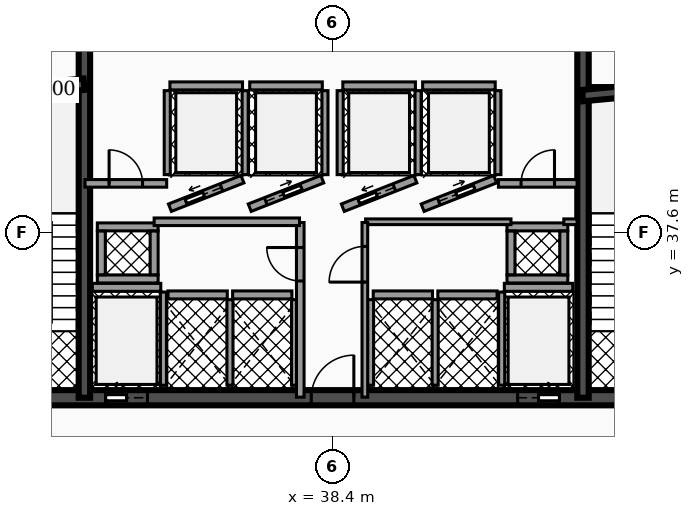
"""IFC4 building model, lengths in metres.
Left out: names, types, materials, properties, quantities, classifications, styles, units other than length and angle.
Written with IfcOpenShell. Run it as: python <this file> out.ifc"""

import sys

from ifc_helpers import new_model, si_unit, direction, frame, frame_2d, origin, place, context, subcontext, project, spatial, rectangle, extrude, element, fill, save


model = new_model("IFC4")
c1 = context("Model", 3, precision=1e-05, world=origin(), true_north=direction((0.0, 1.0)))
c2 = subcontext(c1, "Body", "Model", "MODEL_VIEW")
j1 = project(units=[si_unit("LENGTHUNIT", "METRE"), si_unit("PLANEANGLEUNIT", "RADIAN")], contexts=[c1])
p1 = place(None, origin())
s1 = spatial("IfcSite", under=j1, at=p1, CompositionType="ELEMENT")
p2 = place(p1, origin())
s2 = spatial("IfcBuilding", under=s1, at=p2, CompositionType="ELEMENT")
p3 = place(p2, frame((0.0, 0.0, 92.82)))
s3 = spatial("IfcBuildingStorey", under=s2, at=p3, CompositionType="ELEMENT", Elevation=92.82)
p4 = place(p3, frame((28.4, 33.25, 0.0), z_axis=(0.0, 0.0, 1.0), x_axis=(1.0, 0.0, 0.0)))
e1 = element("IfcWall", 1, at=p4, inside=s3, PredefinedType="SHEAR", context=c2, shape_type="SweptSolid", body=[
    extrude(rectangle(XDim=20.06, YDim=0.4, at=frame_2d((10.03, 0.0))), origin(), (0.0, 0.0, 1.0), 3.82),
])
p5 = place(p4, frame((4.03, 0.0, 0.0)))
e2 = element("IfcOpeningElement", 2, at=p5, cuts=e1, PredefinedType="OPENING", context=c2, shape_type="SweptSolid", body=[
    extrude(rectangle(XDim=1.1, YDim=2.15, at=frame_2d((0.55, 1.075))), frame((0.0, 0.21, 0.0), z_axis=(0.0, -1.0, 0.0), x_axis=(1.0, 0.0, 0.0)), (0.0, 0.0, 1.0), 0.42),
])
p6 = place(p4, frame((14.87, 0.0, 0.0)))
e3 = element("IfcOpeningElement", 3, at=p6, cuts=e1, PredefinedType="OPENING", context=c2, shape_type="SweptSolid", body=[
    extrude(rectangle(XDim=1.1, YDim=2.15, at=frame_2d((0.55, 1.075))), frame((0.0, 0.21, 0.0), z_axis=(0.0, -1.0, 0.0), x_axis=(1.0, 0.0, 0.0)), (0.0, 0.0, 1.0), 0.42),
])
p7 = place(p4, frame((1.31, 0.0, 0.0)))
e4 = element("IfcOpeningElement", 4, at=p7, cuts=e1, PredefinedType="OPENING", context=c2, shape_type="SweptSolid", body=[
    extrude(rectangle(XDim=1.1, YDim=2.2, at=frame_2d((0.55, 1.1))), frame((0.0, 0.21, 0.0), z_axis=(0.0, -1.0, 0.0), x_axis=(1.0, 0.0, 0.0)), (0.0, 0.0, 1.0), 0.42),
])
p8 = place(p4, frame((9.44, 0.0, 0.0)))
e5 = element("IfcOpeningElement", 5, at=p8, cuts=e1, PredefinedType="OPENING", context=c2, shape_type="SweptSolid", body=[
    extrude(rectangle(XDim=1.12, YDim=2.05, at=frame_2d((0.56, 1.025))), frame((0.0, 0.21, 0.0), z_axis=(0.0, -1.0, 0.0), x_axis=(1.0, 0.0, 0.0)), (0.0, 0.0, 1.0), 0.42),
])
p9 = place(p4, frame((17.65, 0.0, 0.0)))
e6 = element("IfcOpeningElement", 6, at=p9, cuts=e1, PredefinedType="OPENING", context=c2, shape_type="SweptSolid", body=[
    extrude(rectangle(XDim=1.1, YDim=2.2, at=frame_2d((0.55, 1.1))), frame((0.0, 0.21, 0.0), z_axis=(0.0, -1.0, 0.0), x_axis=(1.0, 0.0, 0.0)), (0.0, 0.0, 1.0), 0.42),
])
for number, where, z_axis, x_axis in (
    (7, (31.87, 33.25, 0.0), (0.0, 0.0, 1.0), (0.0, 1.0, 0.0)),
    (8, (44.99, 33.25, 0.0), (0.0, 0.0, 1.0), (0.0, 1.0, 0.0)),
):
    element("IfcWall", number, at=place(p3, frame(where, z_axis=z_axis, x_axis=x_axis)), inside=s3, PredefinedType="SHEAR", context=c2, shape_type="SweptSolid", body=[
        extrude(rectangle(XDim=10.2, YDim=0.3, at=frame_2d((5.1, 0.0))), origin(), (0.0, 0.0, 1.0), 3.82),
    ])
p10 = place(p3, frame((28.64, 41.2, 0.0), z_axis=(0.0, 0.0, 1.0), x_axis=(0.995687118776, 0.092774789157, 0.0)))
e9 = element("IfcWall", 9, at=p10, inside=s3, PredefinedType="SHEAR", context=c2, shape_type="SweptSolid", body=[
    extrude(rectangle(XDim=3.234, YDim=0.3, at=frame_2d((1.617, 0.0))), origin(), (0.0, 0.0, 1.0), 3.82),
])
p11 = place(p3, frame((44.98, 41.2, 0.0), z_axis=(0.0, 0.0, 1.0), x_axis=(0.995686468965, 0.09278176286, 0.0)))
e10 = element("IfcWall", 10, at=p11, inside=s3, PredefinedType="SHEAR", context=c2, shape_type="SweptSolid", body=[
    extrude(rectangle(XDim=3.234, YDim=0.3, at=frame_2d((1.617, 0.0))), origin(), (0.0, 0.0, 1.0), 3.82),
])
p12 = place(p3, frame((32.08, 36.155, 0.0), z_axis=(0.0, 0.0, 1.0), x_axis=(1.0, 0.0, 0.0)))
e11 = element("IfcWall", 11, at=p12, inside=s3, PredefinedType="SOLIDWALL", context=c2, shape_type="SweptSolid", body=[
    extrude(rectangle(XDim=1.8, YDim=0.21, at=frame_2d((0.9, 0.0))), origin(), (0.0, 0.0, 1.0), 2.792),
])
p13 = place(p3, frame((33.95, 33.58, 0.0), z_axis=(0.0, 0.0, 1.0), x_axis=(0.0, 1.0, 0.0)))
e12 = element("IfcWall", 12, at=p13, inside=s3, PredefinedType="SOLIDWALL", context=c2, shape_type="SweptSolid", body=[
    extrude(rectangle(XDim=2.45, YDim=0.16, at=frame_2d((1.225, 0.0))), origin(), (0.0, 0.0, 1.0), 2.792),
])
p14 = place(p3, frame((42.92, 36.155, 0.0), z_axis=(0.0, 0.0, 1.0), x_axis=(1.0, 0.0, 0.0)))
e13 = element("IfcWall", 13, at=p14, inside=s3, PredefinedType="SOLIDWALL", context=c2, shape_type="SweptSolid", body=[
    extrude(rectangle(XDim=1.8, YDim=0.21, at=frame_2d((0.9, 0.0))), origin(), (0.0, 0.0, 1.0), 2.792),
])
p15 = place(p3, frame((42.85, 33.58, 0.0), z_axis=(0.0, 0.0, 1.0), x_axis=(0.0, 1.0, 0.0)))
e14 = element("IfcWall", 14, at=p15, inside=s3, PredefinedType="SOLIDWALL", context=c2, shape_type="SweptSolid", body=[
    extrude(rectangle(XDim=2.45, YDim=0.16, at=frame_2d((1.225, 0.0))), origin(), (0.0, 0.0, 1.0), 2.792),
])
p16 = place(p3, frame((34.12, 38.25, 0.0), z_axis=(0.0, 0.0, 1.0), x_axis=(0.930804993012, 0.36551616241, 0.0)))
e15 = element("IfcWall", 15, at=p16, inside=s3, PredefinedType="SOLIDWALL", context=c2, shape_type="SweptSolid", body=[
    extrude(rectangle(XDim=2.052, YDim=0.21, at=frame_2d((1.026, 0.0))), origin(), (0.0, 0.0, 1.0), 2.792),
])
p17 = place(p16, frame((0.455, 0.0, 0.0)))
e16 = element("IfcOpeningElement", 16, at=p17, cuts=e15, PredefinedType="OPENING", context=c2, shape_type="SweptSolid", body=[
    extrude(rectangle(XDim=1.0, YDim=2.1, at=frame_2d((0.5, 1.05))), frame((0.0, 0.115, 0.0), z_axis=(0.0, -1.0, 0.0), x_axis=(1.0, 0.0, 0.0)), (0.0, 0.0, 1.0), 0.23),
])
p18 = place(p3, frame((34.12, 41.455, 0.0), z_axis=(0.0, 0.0, 1.0), x_axis=(1.0, 0.0, 0.0)))
e17 = element("IfcWall", 17, at=p18, inside=s3, PredefinedType="SOLIDWALL", context=c2, shape_type="SweptSolid", body=[
    extrude(rectangle(XDim=1.91, YDim=0.21, at=frame_2d((0.955, 0.0))), origin(), (0.0, 0.0, 1.0), 2.792),
])
for number, where, z_axis, x_axis in (
    (18, (34.05, 39.12, 0.0), (0.0, 0.0, 1.0), (0.0, 1.0, 0.0)),
    (19, (36.1, 39.12, 0.0), (0.0, 0.0, 1.0), (0.0, 1.0, 0.0)),
):
    element("IfcWall", number, at=place(p3, frame(where, z_axis=z_axis, x_axis=x_axis)), inside=s3, PredefinedType="SOLIDWALL", context=c2, shape_type="SweptSolid", body=[
        extrude(rectangle(XDim=2.21, YDim=0.16, at=frame_2d((1.105, 0.0))), origin(), (0.0, 0.0, 1.0), 2.792),
    ])
p19 = place(p3, frame((36.22, 38.25, 0.0), z_axis=(0.0, 0.0, 1.0), x_axis=(0.930804993012, 0.36551616241, 0.0)))
e20 = element("IfcWall", 20, at=p19, inside=s3, PredefinedType="SOLIDWALL", context=c2, shape_type="SweptSolid", body=[
    extrude(rectangle(XDim=2.052, YDim=0.21, at=frame_2d((1.026, 0.0))), origin(), (0.0, 0.0, 1.0), 2.792),
])
p20 = place(p19, frame((0.455, 0.0, 0.0)))
e21 = element("IfcOpeningElement", 21, at=p20, cuts=e20, PredefinedType="OPENING", context=c2, shape_type="SweptSolid", body=[
    extrude(rectangle(XDim=1.0, YDim=2.1, at=frame_2d((0.5, 1.05))), frame((0.0, 0.115, 0.0), z_axis=(0.0, -1.0, 0.0), x_axis=(1.0, 0.0, 0.0)), (0.0, 0.0, 1.0), 0.23),
])
p21 = place(p3, frame((36.22, 41.455, 0.0), z_axis=(0.0, 0.0, 1.0), x_axis=(1.0, 0.0, 0.0)))
e22 = element("IfcWall", 22, at=p21, inside=s3, PredefinedType="SOLIDWALL", context=c2, shape_type="SweptSolid", body=[
    extrude(rectangle(XDim=1.91, YDim=0.21, at=frame_2d((0.955, 0.0))), origin(), (0.0, 0.0, 1.0), 2.792),
])
p22 = place(p3, frame((38.2, 39.12, 0.0), z_axis=(0.0, 0.0, 1.0), x_axis=(0.0, 1.0, 0.0)))
e23 = element("IfcWall", 23, at=p22, inside=s3, PredefinedType="SOLIDWALL", context=c2, shape_type="SweptSolid", body=[
    extrude(rectangle(XDim=2.21, YDim=0.16, at=frame_2d((1.105, 0.0))), origin(), (0.0, 0.0, 1.0), 2.792),
])
p23 = place(p3, frame((38.67, 38.25, 0.0), z_axis=(0.0, 0.0, 1.0), x_axis=(0.930820886763, 0.3654756856, 0.0)))
e24 = element("IfcWall", 24, at=p23, inside=s3, PredefinedType="SOLIDWALL", context=c2, shape_type="SweptSolid", body=[
    extrude(rectangle(XDim=2.052, YDim=0.21, at=frame_2d((1.026, 0.0))), origin(), (0.0, 0.0, 1.0), 2.792),
])
p24 = place(p23, frame((0.455, 0.0, 0.0)))
e25 = element("IfcOpeningElement", 25, at=p24, cuts=e24, PredefinedType="OPENING", context=c2, shape_type="SweptSolid", body=[
    extrude(rectangle(XDim=1.0, YDim=2.1, at=frame_2d((0.5, 1.05))), frame((0.0, 0.115, 0.0), z_axis=(0.0, -1.0, 0.0), x_axis=(1.0, 0.0, 0.0)), (0.0, 0.0, 1.0), 0.23),
])
p25 = place(p3, frame((38.67, 41.455, 0.0), z_axis=(0.0, 0.0, 1.0), x_axis=(1.0, 0.0, 0.0)))
e26 = element("IfcWall", 26, at=p25, inside=s3, PredefinedType="SOLIDWALL", context=c2, shape_type="SweptSolid", body=[
    extrude(rectangle(XDim=1.91, YDim=0.21, at=frame_2d((0.955, 0.0))), origin(), (0.0, 0.0, 1.0), 2.792),
])
for number, where, z_axis, x_axis in (
    (27, (38.6, 39.12, 0.0), (0.0, 0.0, 1.0), (0.0, 1.0, 0.0)),
    (28, (40.65, 39.12, 0.0), (0.0, 0.0, 1.0), (0.0, 1.0, 0.0)),
):
    element("IfcWall", number, at=place(p3, frame(where, z_axis=z_axis, x_axis=x_axis)), inside=s3, PredefinedType="SOLIDWALL", context=c2, shape_type="SweptSolid", body=[
        extrude(rectangle(XDim=2.21, YDim=0.16, at=frame_2d((1.105, 0.0))), origin(), (0.0, 0.0, 1.0), 2.792),
    ])
p26 = place(p3, frame((40.77, 38.25, 0.0), z_axis=(0.0, 0.0, 1.0), x_axis=(0.930804993012, 0.36551616241, 0.0)))
e29 = element("IfcWall", 29, at=p26, inside=s3, PredefinedType="SOLIDWALL", context=c2, shape_type="SweptSolid", body=[
    extrude(rectangle(XDim=2.052, YDim=0.21, at=frame_2d((1.026, 0.0))), origin(), (0.0, 0.0, 1.0), 2.792),
])
p27 = place(p26, frame((0.455, 0.0, 0.0)))
e30 = element("IfcOpeningElement", 30, at=p27, cuts=e29, PredefinedType="OPENING", context=c2, shape_type="SweptSolid", body=[
    extrude(rectangle(XDim=1.0, YDim=2.1, at=frame_2d((0.5, 1.05))), frame((0.0, 0.115, 0.0), z_axis=(0.0, -1.0, 0.0), x_axis=(1.0, 0.0, 0.0)), (0.0, 0.0, 1.0), 0.23),
])
p28 = place(p3, frame((40.77, 41.455, 0.0), z_axis=(0.0, 0.0, 1.0), x_axis=(1.0, 0.0, 0.0)))
e31 = element("IfcWall", 31, at=p28, inside=s3, PredefinedType="SOLIDWALL", context=c2, shape_type="SweptSolid", body=[
    extrude(rectangle(XDim=1.91, YDim=0.21, at=frame_2d((0.955, 0.0))), origin(), (0.0, 0.0, 1.0), 2.792),
])
p29 = place(p3, frame((42.75, 39.12, 0.0), z_axis=(0.0, 0.0, 1.0), x_axis=(0.0, 1.0, 0.0)))
e32 = element("IfcWall", 32, at=p29, inside=s3, PredefinedType="SOLIDWALL", context=c2, shape_type="SweptSolid", body=[
    extrude(rectangle(XDim=2.21, YDim=0.16, at=frame_2d((1.105, 0.0))), origin(), (0.0, 0.0, 1.0), 2.792),
])
p30 = place(p3, frame((34.07, 35.955, 0.0), z_axis=(0.0, 0.0, 1.0), x_axis=(1.0, 0.0, 0.0)))
e33 = element("IfcWall", 33, at=p30, inside=s3, PredefinedType="SOLIDWALL", context=c2, shape_type="SweptSolid", body=[
    extrude(rectangle(XDim=1.56, YDim=0.21, at=frame_2d((0.78, 0.0))), origin(), (0.0, 0.0, 1.0), 2.792),
])
p31 = place(p3, frame((35.7, 33.58, 0.0), z_axis=(0.0, 0.0, 1.0), x_axis=(0.0, 1.0, 0.0)))
e34 = element("IfcWall", 34, at=p31, inside=s3, PredefinedType="SOLIDWALL", context=c2, shape_type="SweptSolid", body=[
    extrude(rectangle(XDim=2.25, YDim=0.16, at=frame_2d((1.125, 0.0))), origin(), (0.0, 0.0, 1.0), 2.792),
])
p32 = place(p3, frame((35.77, 35.955, 0.0), z_axis=(0.0, 0.0, 1.0), x_axis=(1.0, 0.0, 0.0)))
e35 = element("IfcWall", 35, at=p32, inside=s3, PredefinedType="SOLIDWALL", context=c2, shape_type="SweptSolid", body=[
    extrude(rectangle(XDim=1.56, YDim=0.21, at=frame_2d((0.78, 0.0))), origin(), (0.0, 0.0, 1.0), 2.792),
])
p33 = place(p3, frame((37.4, 33.58, 0.0), z_axis=(0.0, 0.0, 1.0), x_axis=(0.0, 1.0, 0.0)))
e36 = element("IfcWall", 36, at=p33, inside=s3, PredefinedType="SOLIDWALL", context=c2, shape_type="SweptSolid", body=[
    extrude(rectangle(XDim=2.25, YDim=0.16, at=frame_2d((1.125, 0.0))), origin(), (0.0, 0.0, 1.0), 2.792),
])
p34 = place(p3, frame((39.47, 35.955, 0.0), z_axis=(0.0, 0.0, 1.0), x_axis=(1.0, 0.0, 0.0)))
e37 = element("IfcWall", 37, at=p34, inside=s3, PredefinedType="SOLIDWALL", context=c2, shape_type="SweptSolid", body=[
    extrude(rectangle(XDim=1.56, YDim=0.21, at=frame_2d((0.78, 0.0))), origin(), (0.0, 0.0, 1.0), 2.792),
])
for number, where, z_axis, x_axis in (
    (38, (39.4, 33.58, 0.0), (0.0, 0.0, 1.0), (0.0, 1.0, 0.0)),
    (39, (41.1, 33.58, 0.0), (0.0, 0.0, 1.0), (0.0, 1.0, 0.0)),
):
    element("IfcWall", number, at=place(p3, frame(where, z_axis=z_axis, x_axis=x_axis)), inside=s3, PredefinedType="SOLIDWALL", context=c2, shape_type="SweptSolid", body=[
        extrude(rectangle(XDim=2.25, YDim=0.16, at=frame_2d((1.125, 0.0))), origin(), (0.0, 0.0, 1.0), 2.792),
    ])
p35 = place(p3, frame((41.17, 35.955, 0.0), z_axis=(0.0, 0.0, 1.0), x_axis=(1.0, 0.0, 0.0)))
e40 = element("IfcWall", 40, at=p35, inside=s3, PredefinedType="SOLIDWALL", context=c2, shape_type="SweptSolid", body=[
    extrude(rectangle(XDim=1.56, YDim=0.21, at=frame_2d((0.78, 0.0))), origin(), (0.0, 0.0, 1.0), 2.792),
])
for number, where, z_axis, x_axis in (
    (41, (32.21, 36.375, 0.0), (0.0, 0.0, 1.0), (1.0, 0.0, 0.0)),
    (42, (32.21, 37.745, 0.0), (0.0, 0.0, 1.0), (1.0, 0.0, 0.0)),
):
    element("IfcWall", number, at=place(p3, frame(where, z_axis=z_axis, x_axis=x_axis)), inside=s3, PredefinedType="SOLIDWALL", context=c2, shape_type="SweptSolid", body=[
        extrude(rectangle(XDim=1.6, YDim=0.21, at=frame_2d((0.8, 0.0))), origin(), (0.0, 0.0, 1.0), 3.82),
    ])
for number, where, z_axis, x_axis in (
    (43, (32.315, 36.485, 0.0), (0.0, 0.0, 1.0), (0.0, 1.0, 0.0)),
    (44, (33.705, 36.485, 0.0), (0.0, 0.0, 1.0), (0.0, 1.0, 0.0)),
):
    element("IfcWall", number, at=place(p3, frame(where, z_axis=z_axis, x_axis=x_axis)), inside=s3, PredefinedType="SOLIDWALL", context=c2, shape_type="SweptSolid", body=[
        extrude(rectangle(XDim=1.15, YDim=0.21, at=frame_2d((0.575, 0.0))), origin(), (0.0, 0.0, 1.0), 3.82),
    ])
for number, where, z_axis, x_axis in (
    (45, (42.99, 36.375, 0.0), (0.0, 0.0, 1.0), (1.0, 0.0, 0.0)),
    (46, (42.99, 37.745, 0.0), (0.0, 0.0, 1.0), (1.0, 0.0, 0.0)),
):
    element("IfcWall", number, at=place(p3, frame(where, z_axis=z_axis, x_axis=x_axis)), inside=s3, PredefinedType="SOLIDWALL", context=c2, shape_type="SweptSolid", body=[
        extrude(rectangle(XDim=1.6, YDim=0.21, at=frame_2d((0.8, 0.0))), origin(), (0.0, 0.0, 1.0), 3.82),
    ])
for number, where, z_axis, x_axis in (
    (47, (43.095, 36.485, 0.0), (0.0, 0.0, 1.0), (0.0, 1.0, 0.0)),
    (48, (44.485, 36.485, 0.0), (0.0, 0.0, 1.0), (0.0, 1.0, 0.0)),
):
    element("IfcWall", number, at=place(p3, frame(where, z_axis=z_axis, x_axis=x_axis)), inside=s3, PredefinedType="SOLIDWALL", context=c2, shape_type="SweptSolid", body=[
        extrude(rectangle(XDim=1.15, YDim=0.21, at=frame_2d((0.575, 0.0))), origin(), (0.0, 0.0, 1.0), 3.82),
    ])
p36 = place(p3, frame((37.55, 33.265, 0.0), z_axis=(0.0, 0.0, 1.0), x_axis=(0.0, 1.0, 0.0)))
e49 = element("IfcWall", 49, at=p36, inside=s3, PredefinedType="PARTITIONING", context=c2, shape_type="SweptSolid", body=[
    extrude(rectangle(XDim=4.595, YDim=0.2, at=frame_2d((2.298, 0.0))), origin(), (0.0, 0.0, 1.0), 2.777),
])
p37 = place(p36, frame((3.058, 0.0, 0.0)))
e50 = element("IfcOpeningElement", 50, at=p37, cuts=e49, PredefinedType="OPENING", context=c2, shape_type="SweptSolid", body=[
    extrude(rectangle(XDim=0.88, YDim=2.05, at=frame_2d((0.44, 1.025))), frame((0.0, 0.11, 0.0), z_axis=(0.0, -1.0, 0.0), x_axis=(1.0, 0.0, 0.0)), (0.0, 0.0, 1.0), 0.22),
])
p38 = place(p3, frame((33.705, 37.88, 0.0), z_axis=(0.0, 0.0, 1.0), x_axis=(1.0, 0.0, 0.0)))
e51 = element("IfcWall", 51, at=p38, inside=s3, PredefinedType="PARTITIONING", context=c2, shape_type="SweptSolid", body=[
    extrude(rectangle(XDim=3.825, YDim=0.2, at=frame_2d((1.913, 0.0))), origin(), (0.0, 0.0, 1.0), 2.777),
])
p39 = place(p3, frame((31.885, 38.89, 0.0), z_axis=(0.0, 0.0, 1.0), x_axis=(1.0, 0.0, 0.0)))
e52 = element("IfcWall", 52, at=p39, inside=s3, PredefinedType="PARTITIONING", context=c2, shape_type="SweptSolid", body=[
    extrude(rectangle(XDim=2.15, YDim=0.2, at=frame_2d((1.075, 0.0))), origin(), (0.0, 0.0, 1.0), 2.777),
])
p40 = place(p39, frame((0.635, 0.0, 0.0)))
e53 = element("IfcOpeningElement", 53, at=p40, cuts=e52, PredefinedType="OPENING", context=c2, shape_type="SweptSolid", body=[
    extrude(rectangle(XDim=0.88, YDim=2.05, at=frame_2d((0.44, 1.025))), frame((0.0, 0.11, 0.0), z_axis=(0.0, -1.0, 0.0), x_axis=(1.0, 0.0, 0.0)), (0.0, 0.0, 1.0), 0.22),
])
p41 = place(p3, frame((42.765, 38.89, 0.0), z_axis=(0.0, 0.0, 1.0), x_axis=(1.0, 0.0, 0.0)))
e54 = element("IfcWall", 54, at=p41, inside=s3, PredefinedType="PARTITIONING", context=c2, shape_type="SweptSolid", body=[
    extrude(rectangle(XDim=2.07, YDim=0.2, at=frame_2d((1.035, 0.0))), origin(), (0.0, 0.0, 1.0), 2.777),
])
p42 = place(p41, frame((0.595, 0.0, 0.0)))
e55 = element("IfcOpeningElement", 55, at=p42, cuts=e54, PredefinedType="OPENING", context=c2, shape_type="SweptSolid", body=[
    extrude(rectangle(XDim=0.88, YDim=2.05, at=frame_2d((0.44, 1.025))), frame((0.0, 0.11, 0.0), z_axis=(0.0, -1.0, 0.0), x_axis=(1.0, 0.0, 0.0)), (0.0, 0.0, 1.0), 0.22),
])
p43 = place(p3, frame((39.27, 37.88, 0.0), z_axis=(0.0, 0.0, 1.0), x_axis=(1.0, 0.0, 0.0)))
e56 = element("IfcWall", 56, at=p43, inside=s3, PredefinedType="PARTITIONING", context=c2, shape_type="SweptSolid", body=[
    extrude(rectangle(XDim=3.825, YDim=0.15, at=frame_2d((1.913, 0.0))), origin(), (0.0, 0.0, 1.0), 2.777),
])
p44 = place(p3, frame((44.485, 37.88, 0.0), z_axis=(0.0, 0.0, 1.0), x_axis=(1.0, 0.0, 0.0)))
e57 = element("IfcWall", 57, at=p44, inside=s3, PredefinedType="PARTITIONING", context=c2, shape_type="SweptSolid", body=[
    extrude(rectangle(XDim=0.35, YDim=0.15, at=frame_2d((0.175, 0.0))), origin(), (0.0, 0.0, 1.0), 2.777),
])
p45 = place(p3, frame((39.25, 33.265, 0.0), z_axis=(0.0, 0.0, 1.0), x_axis=(0.0, 1.0, 0.0)))
e58 = element("IfcWall", 58, at=p45, inside=s3, PredefinedType="PARTITIONING", context=c2, shape_type="SweptSolid", body=[
    extrude(rectangle(XDim=4.595, YDim=0.15, at=frame_2d((2.298, 0.0))), origin(), (0.0, 0.0, 1.0), 2.777),
])
p46 = place(p45, frame((3.028, 0.0, 0.0)))
e59 = element("IfcOpeningElement", 59, at=p46, cuts=e58, PredefinedType="OPENING", context=c2, shape_type="SweptSolid", body=[
    extrude(rectangle(XDim=0.94, YDim=2.05, at=frame_2d((0.47, 1.025))), frame((0.0, 0.085, 0.0), z_axis=(0.0, -1.0, 0.0), x_axis=(1.0, 0.0, 0.0)), (0.0, 0.0, 1.0), 0.17),
])
p47 = place(p5, origin())
e60 = element("IfcDoor", 60, at=p47, inside=s3, OperationType="SLIDING_TO_LEFT", PredefinedType="DOOR", context=c2, shape_type="SweptSolid", body=[
    extrude(rectangle(XDim=1.1, YDim=2.15, at=frame_2d((0.55, 1.075))), frame((0.0, 0.025, 0.0), z_axis=(0.0, -1.0, 0.0), x_axis=(1.0, 0.0, 0.0)), (0.0, 0.0, 1.0), 0.05),
])
fill(e2, e60)
p48 = place(p6, origin())
e61 = element("IfcDoor", 61, at=p48, inside=s3, OperationType="SLIDING_TO_RIGHT", PredefinedType="DOOR", context=c2, shape_type="SweptSolid", body=[
    extrude(rectangle(XDim=1.1, YDim=2.15, at=frame_2d((0.55, 1.075))), frame((0.0, 0.025, 0.0), z_axis=(0.0, -1.0, 0.0), x_axis=(1.0, 0.0, 0.0)), (0.0, 0.0, 1.0), 0.05),
])
fill(e3, e61)
p49 = place(p17, origin())
e62 = element("IfcDoor", 62, at=p49, inside=s3, OperationType="SLIDING_TO_LEFT", PredefinedType="DOOR", context=c2, shape_type="SweptSolid", body=[
    extrude(rectangle(XDim=1.0, YDim=2.1, at=frame_2d((0.5, 1.05))), frame((0.0, 0.025, 0.0), z_axis=(0.0, -1.0, 0.0), x_axis=(1.0, 0.0, 0.0)), (0.0, 0.0, 1.0), 0.05),
])
fill(e16, e62)
p50 = place(p20, origin())
e63 = element("IfcDoor", 63, at=p50, inside=s3, OperationType="SLIDING_TO_RIGHT", PredefinedType="DOOR", context=c2, shape_type="SweptSolid", body=[
    extrude(rectangle(XDim=1.0, YDim=2.1, at=frame_2d((0.5, 1.05))), frame((0.0, 0.025, 0.0), z_axis=(0.0, -1.0, 0.0), x_axis=(1.0, 0.0, 0.0)), (0.0, 0.0, 1.0), 0.05),
])
fill(e21, e63)
p51 = place(p24, origin())
e64 = element("IfcDoor", 64, at=p51, inside=s3, OperationType="SLIDING_TO_LEFT", PredefinedType="DOOR", context=c2, shape_type="SweptSolid", body=[
    extrude(rectangle(XDim=1.0, YDim=2.1, at=frame_2d((0.5, 1.05))), frame((0.0, 0.025, 0.0), z_axis=(0.0, -1.0, 0.0), x_axis=(1.0, 0.0, 0.0)), (0.0, 0.0, 1.0), 0.05),
])
fill(e25, e64)
p52 = place(p27, origin())
e65 = element("IfcDoor", 65, at=p52, inside=s3, OperationType="SLIDING_TO_RIGHT", PredefinedType="DOOR", context=c2, shape_type="SweptSolid", body=[
    extrude(rectangle(XDim=1.0, YDim=2.1, at=frame_2d((0.5, 1.05))), frame((0.0, 0.025, 0.0), z_axis=(0.0, -1.0, 0.0), x_axis=(1.0, 0.0, 0.0)), (0.0, 0.0, 1.0), 0.05),
])
fill(e30, e65)
p53 = place(p8, origin())
e66 = element("IfcDoor", 66, at=p53, inside=s3, OperationType="SINGLE_SWING_RIGHT", PredefinedType="DOOR", context=c2, shape_type="SweptSolid", body=[
    extrude(rectangle(XDim=1.12, YDim=2.05, at=frame_2d((0.56, 1.025))), frame((0.0, 0.025, 0.0), z_axis=(0.0, -1.0, 0.0), x_axis=(1.0, 0.0, 0.0)), (0.0, 0.0, 1.0), 0.05),
])
fill(e5, e66)
p54 = place(p37, origin())
e67 = element("IfcDoor", 67, at=p54, inside=s3, OperationType="SINGLE_SWING_RIGHT", PredefinedType="DOOR", context=c2, shape_type="SweptSolid", body=[
    extrude(rectangle(XDim=0.88, YDim=2.05, at=frame_2d((0.44, 1.025))), frame((0.0, 0.025, 0.0), z_axis=(0.0, -1.0, 0.0), x_axis=(1.0, 0.0, 0.0)), (0.0, 0.0, 1.0), 0.05),
])
fill(e50, e67)
p55 = place(p40, origin())
e68 = element("IfcDoor", 68, at=p55, inside=s3, OperationType="SINGLE_SWING_LEFT", PredefinedType="DOOR", context=c2, shape_type="SweptSolid", body=[
    extrude(rectangle(XDim=0.88, YDim=2.05, at=frame_2d((0.44, 1.025))), frame((0.0, 0.025, 0.0), z_axis=(0.0, -1.0, 0.0), x_axis=(1.0, 0.0, 0.0)), (0.0, 0.0, 1.0), 0.05),
])
fill(e53, e68)
p56 = place(p42, origin())
e69 = element("IfcDoor", 69, at=p56, inside=s3, OperationType="SINGLE_SWING_RIGHT", PredefinedType="DOOR", context=c2, shape_type="SweptSolid", body=[
    extrude(rectangle(XDim=0.88, YDim=2.05, at=frame_2d((0.44, 1.025))), frame((0.0, 0.025, 0.0), z_axis=(0.0, -1.0, 0.0), x_axis=(1.0, 0.0, 0.0)), (0.0, 0.0, 1.0), 0.05),
])
fill(e55, e69)
p57 = place(p46, origin())
e70 = element("IfcDoor", 70, at=p57, inside=s3, OperationType="SINGLE_SWING_LEFT", PredefinedType="DOOR", context=c2, shape_type="SweptSolid", body=[
    extrude(rectangle(XDim=0.94, YDim=2.05, at=frame_2d((0.47, 1.025))), frame((0.0, 0.025, 0.0), z_axis=(0.0, -1.0, 0.0), x_axis=(1.0, 0.0, 0.0)), (0.0, 0.0, 1.0), 0.05),
])
fill(e59, e70)
save(model, sys.argv[1])
